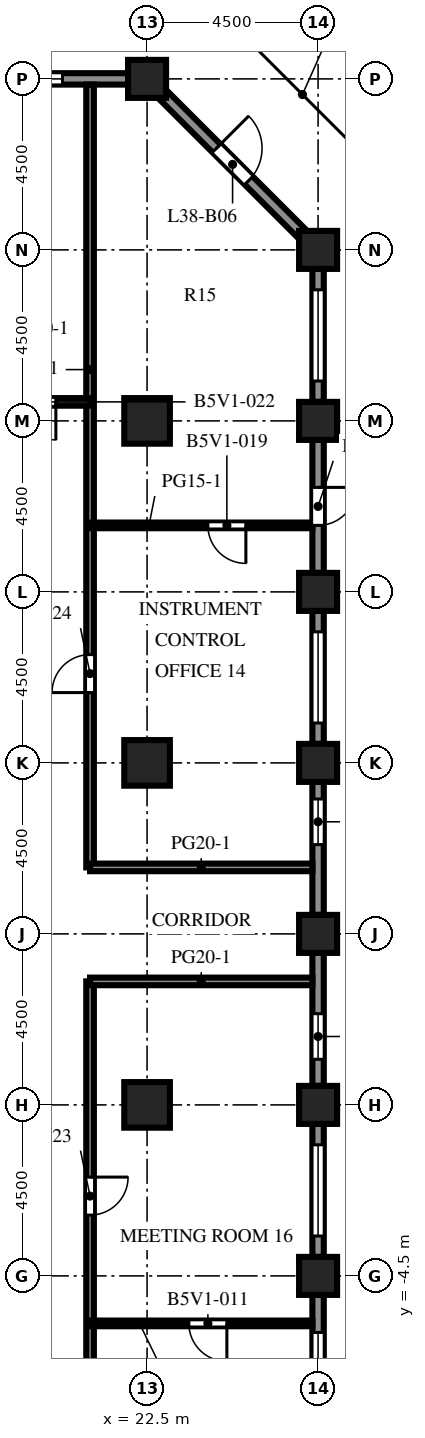
"""IFC4 building model, lengths in metres.
Left out: names, types, materials, properties, quantities, classifications, styles, units other than length and angle.
Written with IfcOpenShell. Run it as: python <this file> out.ifc"""

import sys

from ifc_helpers import new_model, si_unit, direction, frame, frame_2d, origin, origin_2d, place, context, subcontext, project, spatial, rectangle, extrude, element, fill, save


model = new_model("IFC4")
c1 = context("Model", 3, precision=1e-05, world=origin(), true_north=direction((0.0, 1.0)))
c2 = subcontext(c1, "Body", "Model", "MODEL_VIEW")
j1 = project(units=[si_unit("LENGTHUNIT", "METRE"), si_unit("PLANEANGLEUNIT", "RADIAN")], contexts=[c1])
p1 = place(None, origin())
s1 = spatial("IfcSite", under=j1, at=p1, CompositionType="ELEMENT")
p2 = place(p1, origin())
s2 = spatial("IfcBuilding", under=s1, at=p2, CompositionType="ELEMENT")
p3 = place(p2, frame((0.0, 0.0, 169.1)))
s3 = spatial("IfcBuildingStorey", under=s2, at=p3, CompositionType="ELEMENT", Elevation=169.1)
for number, where, z_axis, x_axis in (
    (1, (22.5, 27.0, 0.0), (0.0, 0.0, 1.0), (1.0, 0.0, 0.0)),
    (2, (27.0, -4.5, 0.0), (0.0, 0.0, 1.0), (1.0, 0.0, 0.0)),
    (3, (27.0, 0.0, 0.0), (0.0, 0.0, 1.0), (1.0, 0.0, 0.0)),
    (4, (27.0, 4.5, 0.0), (0.0, 0.0, 1.0), (1.0, 0.0, 0.0)),
    (5, (27.0, 9.0, 0.0), (0.0, 0.0, 1.0), (1.0, 0.0, 0.0)),
    (6, (27.0, 13.5, 0.0), (0.0, 0.0, 1.0), (1.0, 0.0, 0.0)),
    (7, (27.0, 18.0, 0.0), (0.0, 0.0, 1.0), (1.0, 0.0, 0.0)),
    (8, (27.0, 22.5, 0.0), (0.0, 0.0, 1.0), (1.0, 0.0, 0.0)),
):
    element("IfcColumn", number, at=place(p3, frame(where, z_axis=z_axis, x_axis=x_axis)), inside=s3, PredefinedType="COLUMN", context=c2, shape_type="SweptSolid", body=[
        extrude(rectangle(XDim=1.0, YDim=1.0, at=origin_2d()), origin(), (0.0, 0.0, 1.0), 4.1),
    ])
for number, where, z_axis, x_axis in (
    (9, (22.5, 0.0, 0.0), (0.0, 0.0, 1.0), (1.0, 0.0, 0.0)),
    (10, (22.5, 9.0, 0.0), (0.0, 0.0, 1.0), (1.0, 0.0, 0.0)),
    (11, (22.5, 18.0, 0.0), (0.0, 0.0, 1.0), (1.0, 0.0, 0.0)),
):
    element("IfcColumn", number, at=place(p3, frame(where, z_axis=z_axis, x_axis=x_axis)), inside=s3, PredefinedType="COLUMN", context=c2, shape_type="SweptSolid", body=[
        extrude(rectangle(XDim=1.2, YDim=1.2, at=origin_2d()), origin(), (0.0, 0.0, 1.0), 4.1),
    ])
p4 = place(p3, frame((27.0, -5.0, 0.0), z_axis=(0.0, 0.0, 1.0), x_axis=(0.0, -1.0, 0.0)))
e12 = element("IfcWall", 12, at=p4, inside=s3, PredefinedType="SOLIDWALL", context=c2, shape_type="SweptSolid", body=[
    extrude(rectangle(XDim=3.5, YDim=0.3, at=frame_2d((1.75, 0.0))), origin(), (0.0, 0.0, 1.0), 2.85),
])
p5 = place(p4, frame((0.988, 0.0, 0.8)))
e13 = element("IfcOpeningElement", 13, at=p5, cuts=e12, PredefinedType="OPENING", context=c2, shape_type="SweptSolid", body=[
    extrude(rectangle(XDim=2.4, YDim=1.7, at=frame_2d((1.2, 0.85))), frame((0.0, 0.16, 0.0), z_axis=(0.0, -1.0, 0.0), x_axis=(1.0, 0.0, 0.0)), (0.0, 0.0, 1.0), 0.32),
])
p6 = place(p3, frame((27.0, -0.5, 0.0), z_axis=(0.0, 0.0, 1.0), x_axis=(0.0, -1.0, 0.0)))
e14 = element("IfcWall", 14, at=p6, inside=s3, PredefinedType="SOLIDWALL", context=c2, shape_type="SweptSolid", body=[
    extrude(rectangle(XDim=3.5, YDim=0.3, at=frame_2d((1.75, 0.0))), origin(), (0.0, 0.0, 1.0), 2.85),
])
p7 = place(p6, frame((0.55, 0.0, 0.8)))
e15 = element("IfcOpeningElement", 15, at=p7, cuts=e14, PredefinedType="OPENING", context=c2, shape_type="SweptSolid", body=[
    extrude(rectangle(XDim=2.4, YDim=1.7, at=frame_2d((1.2, 0.85))), frame((0.0, 0.16, 0.0), z_axis=(0.0, -1.0, 0.0), x_axis=(1.0, 0.0, 0.0)), (0.0, 0.0, 1.0), 0.32),
])
p8 = place(p3, frame((27.0, 4.0, 0.0), z_axis=(0.0, 0.0, 1.0), x_axis=(0.0, -1.0, 0.0)))
e16 = element("IfcWall", 16, at=p8, inside=s3, PredefinedType="SOLIDWALL", context=c2, shape_type="SweptSolid", body=[
    extrude(rectangle(XDim=3.5, YDim=0.3, at=frame_2d((1.75, 0.0))), origin(), (0.0, 0.0, 1.0), 2.85),
])
p9 = place(p8, frame((1.6, 0.0, 0.8)))
e17 = element("IfcOpeningElement", 17, at=p9, cuts=e16, PredefinedType="OPENING", context=c2, shape_type="SweptSolid", body=[
    extrude(rectangle(XDim=1.2, YDim=1.7, at=frame_2d((0.6, 0.85))), frame((0.0, 0.16, 0.0), z_axis=(0.0, -1.0, 0.0), x_axis=(1.0, 0.0, 0.0)), (0.0, 0.0, 1.0), 0.32),
])
p10 = place(p3, frame((27.0, 8.5, 0.0), z_axis=(0.0, 0.0, 1.0), x_axis=(0.0, -1.0, 0.0)))
e18 = element("IfcWall", 18, at=p10, inside=s3, PredefinedType="SOLIDWALL", context=c2, shape_type="SweptSolid", body=[
    extrude(rectangle(XDim=3.5, YDim=0.3, at=frame_2d((1.75, 0.0))), origin(), (0.0, 0.0, 1.0), 2.85),
])
p11 = place(p10, frame((0.45, 0.0, 0.8)))
e19 = element("IfcOpeningElement", 19, at=p11, cuts=e18, PredefinedType="OPENING", context=c2, shape_type="SweptSolid", body=[
    extrude(rectangle(XDim=1.2, YDim=1.7, at=frame_2d((0.6, 0.85))), frame((0.0, 0.16, 0.0), z_axis=(0.0, -1.0, 0.0), x_axis=(1.0, 0.0, 0.0)), (0.0, 0.0, 1.0), 0.32),
])
p12 = place(p3, frame((27.0, 13.0, 0.0), z_axis=(0.0, 0.0, 1.0), x_axis=(0.0, -1.0, 0.0)))
e20 = element("IfcWall", 20, at=p12, inside=s3, PredefinedType="SOLIDWALL", context=c2, shape_type="SweptSolid", body=[
    extrude(rectangle(XDim=3.5, YDim=0.3, at=frame_2d((1.75, 0.0))), origin(), (0.0, 0.0, 1.0), 2.85),
])
p13 = place(p12, frame((0.55, 0.0, 0.8)))
e21 = element("IfcOpeningElement", 21, at=p13, cuts=e20, PredefinedType="OPENING", context=c2, shape_type="SweptSolid", body=[
    extrude(rectangle(XDim=2.4, YDim=1.7, at=frame_2d((1.2, 0.85))), frame((0.0, 0.16, 0.0), z_axis=(0.0, -1.0, 0.0), x_axis=(1.0, 0.0, 0.0)), (0.0, 0.0, 1.0), 0.32),
])
p14 = place(p3, frame((27.0, 17.5, 0.0), z_axis=(0.0, 0.0, 1.0), x_axis=(0.0, -1.0, 0.0)))
e22 = element("IfcWall", 22, at=p14, inside=s3, PredefinedType="SOLIDWALL", context=c2, shape_type="SweptSolid", body=[
    extrude(rectangle(XDim=3.5, YDim=0.3, at=frame_2d((1.75, 0.0))), origin(), (0.0, 0.0, 1.0), 2.85),
])
p15 = place(p14, frame((1.25, 0.0, 0.0)))
e23 = element("IfcOpeningElement", 23, at=p15, cuts=e22, PredefinedType="OPENING", context=c2, shape_type="SweptSolid", body=[
    extrude(rectangle(XDim=1.0, YDim=2.2, at=frame_2d((0.5, 1.1))), frame((0.0, 0.16, 0.0), z_axis=(0.0, -1.0, 0.0), x_axis=(1.0, 0.0, 0.0)), (0.0, 0.0, 1.0), 0.32),
])
p16 = place(p3, frame((27.0, 22.0, 0.0), z_axis=(0.0, 0.0, 1.0), x_axis=(0.0, -1.0, 0.0)))
e24 = element("IfcWall", 24, at=p16, inside=s3, PredefinedType="SOLIDWALL", context=c2, shape_type="SweptSolid", body=[
    extrude(rectangle(XDim=3.5, YDim=0.3, at=frame_2d((1.75, 0.0))), origin(), (0.0, 0.0, 1.0), 2.85),
])
p17 = place(p16, frame((0.55, 0.0, 0.8)))
e25 = element("IfcOpeningElement", 25, at=p17, cuts=e24, PredefinedType="OPENING", context=c2, shape_type="SweptSolid", body=[
    extrude(rectangle(XDim=2.4, YDim=1.7, at=frame_2d((1.2, 0.85))), frame((0.0, 0.16, 0.0), z_axis=(0.0, -1.0, 0.0), x_axis=(1.0, 0.0, 0.0)), (0.0, 0.0, 1.0), 0.32),
])
p18 = place(p3, frame((22.894, 26.606, 0.0), z_axis=(0.0, 0.0, 1.0), x_axis=(0.707106781187, -0.707106781187, 0.0)))
e26 = element("IfcWall", 26, at=p18, inside=s3, PredefinedType="SOLIDWALL", context=c2, shape_type="SweptSolid", body=[
    extrude(rectangle(XDim=5.25, YDim=0.3, at=frame_2d((2.625, 0.0))), origin(), (0.0, 0.0, 1.0), 2.85),
])
p19 = place(p18, frame((2.025, 0.0, 0.0)))
e27 = element("IfcOpeningElement", 27, at=p19, cuts=e26, PredefinedType="OPENING", context=c2, shape_type="SweptSolid", body=[
    extrude(rectangle(XDim=1.2, YDim=2.2, at=frame_2d((0.6, 1.1))), frame((0.0, 0.16, 0.0), z_axis=(0.0, -1.0, 0.0), x_axis=(1.0, 0.0, 0.0)), (0.0, 0.0, 1.0), 0.32),
])
p20 = place(p3, frame((18.5, 27.0, 0.0), z_axis=(0.0, 0.0, 1.0), x_axis=(1.0, 0.0, 0.0)))
e28 = element("IfcWall", 28, at=p20, inside=s3, PredefinedType="SOLIDWALL", context=c2, shape_type="SweptSolid", body=[
    extrude(rectangle(XDim=3.5, YDim=0.3, at=frame_2d((1.75, 0.0))), origin(), (0.0, 0.0, 1.0), 2.85),
])
p21 = place(p20, frame((0.575, 0.0, 0.8)))
e29 = element("IfcOpeningElement", 29, at=p21, cuts=e28, PredefinedType="OPENING", context=c2, shape_type="SweptSolid", body=[
    extrude(rectangle(XDim=1.2, YDim=1.7, at=frame_2d((0.6, 0.85))), frame((0.0, 0.16, 0.0), z_axis=(0.0, -1.0, 0.0), x_axis=(1.0, 0.0, 0.0)), (0.0, 0.0, 1.0), 0.32),
])
p22 = place(p3, frame((21.0, 3.25, 0.0), z_axis=(0.0, 0.0, 1.0), x_axis=(0.0, -1.0, 0.0)))
e30 = element("IfcWall", 30, at=p22, inside=s3, PredefinedType="PARTITIONING", context=c2, shape_type="SweptSolid", body=[
    extrude(rectangle(XDim=30.1, YDim=0.2, at=frame_2d((15.05, 0.0))), origin(), (0.0, 0.0, 1.0), 3.65),
])
p23 = place(p22, frame((5.15, 0.0, 0.0)))
e31 = element("IfcOpeningElement", 31, at=p23, cuts=e30, PredefinedType="OPENING", context=c2, shape_type="SweptSolid", body=[
    extrude(rectangle(XDim=1.0, YDim=2.1, at=frame_2d((0.5, 1.05))), frame((0.0, 0.11, 0.0), z_axis=(0.0, -1.0, 0.0), x_axis=(1.0, 0.0, 0.0)), (0.0, 0.0, 1.0), 0.22),
])
p24 = place(p3, frame((21.0, 26.85, 0.0), z_axis=(0.0, 0.0, 1.0), x_axis=(0.0, -1.0, 0.0)))
e32 = element("IfcWall", 32, at=p24, inside=s3, PredefinedType="PARTITIONING", context=c2, shape_type="SweptSolid", body=[
    extrude(rectangle(XDim=20.6, YDim=0.2, at=frame_2d((10.3, 0.0))), origin(), (0.0, 0.0, 1.0), 3.65),
])
p25 = place(p24, frame((15.0, 0.0, 0.0)))
e33 = element("IfcOpeningElement", 33, at=p25, cuts=e32, PredefinedType="OPENING", context=c2, shape_type="SweptSolid", body=[
    extrude(rectangle(XDim=1.0, YDim=2.1, at=frame_2d((0.5, 1.05))), frame((0.0, 0.11, 0.0), z_axis=(0.0, -1.0, 0.0), x_axis=(1.0, 0.0, 0.0)), (0.0, 0.0, 1.0), 0.22),
])
p26 = place(p3, frame((26.85, -5.75, 0.0), z_axis=(0.0, 0.0, 1.0), x_axis=(-1.0, 0.0, 0.0)))
e34 = element("IfcWall", 34, at=p26, inside=s3, PredefinedType="PARTITIONING", context=c2, shape_type="SweptSolid", body=[
    extrude(rectangle(XDim=5.85, YDim=0.15, at=frame_2d((2.925, 0.0))), origin(), (0.0, 0.0, 1.0), 3.65),
])
p27 = place(p26, frame((2.25, 0.0, 0.0)))
e35 = element("IfcOpeningElement", 35, at=p27, cuts=e34, PredefinedType="OPENING", context=c2, shape_type="SweptSolid", body=[
    extrude(rectangle(XDim=1.0, YDim=2.1, at=frame_2d((0.5, 1.05))), frame((0.0, 0.085, 0.0), z_axis=(0.0, -1.0, 0.0), x_axis=(1.0, 0.0, 0.0)), (0.0, 0.0, 1.0), 0.17),
])
for number, where, z_axis, x_axis in (
    (36, (21.0, 3.25, 0.0), (0.0, 0.0, 1.0), (1.0, 0.0, 0.0)),
    (37, (21.0, 6.25, 0.0), (0.0, 0.0, 1.0), (1.0, 0.0, 0.0)),
):
    element("IfcWall", number, at=place(p3, frame(where, z_axis=z_axis, x_axis=x_axis)), inside=s3, PredefinedType="PARTITIONING", context=c2, shape_type="SweptSolid", body=[
        extrude(rectangle(XDim=5.85, YDim=0.2, at=frame_2d((2.925, 0.0))), origin(), (0.0, 0.0, 1.0), 3.65),
    ])
p28 = place(p3, frame((21.0, 15.25, 0.0), z_axis=(0.0, 0.0, 1.0), x_axis=(1.0, 0.0, 0.0)))
e38 = element("IfcWall", 38, at=p28, inside=s3, PredefinedType="PARTITIONING", context=c2, shape_type="SweptSolid", body=[
    extrude(rectangle(XDim=5.85, YDim=0.15, at=frame_2d((2.925, 0.0))), origin(), (0.0, 0.0, 1.0), 3.65),
])
p29 = place(p28, frame((3.1, 0.0, 0.0)))
e39 = element("IfcOpeningElement", 39, at=p29, cuts=e38, PredefinedType="OPENING", context=c2, shape_type="SweptSolid", body=[
    extrude(rectangle(XDim=1.0, YDim=2.1, at=frame_2d((0.5, 1.05))), frame((0.0, 0.085, 0.0), z_axis=(0.0, -1.0, 0.0), x_axis=(1.0, 0.0, 0.0)), (0.0, 0.0, 1.0), 0.17),
])
p30 = place(p3, frame((18.0, 18.5, 0.0), z_axis=(0.0, 0.0, 1.0), x_axis=(1.0, 0.0, 0.0)))
e40 = element("IfcWall", 40, at=p30, inside=s3, PredefinedType="PARTITIONING", context=c2, shape_type="SweptSolid", body=[
    extrude(rectangle(XDim=3.0, YDim=0.2, at=frame_2d((1.5, 0.0))), origin(), (0.0, 0.0, 1.0), 3.65),
])
p31 = place(p30, frame((1.1, 0.0, 0.0)))
e41 = element("IfcOpeningElement", 41, at=p31, cuts=e40, PredefinedType="OPENING", context=c2, shape_type="SweptSolid", body=[
    extrude(rectangle(XDim=1.0, YDim=2.1, at=frame_2d((0.5, 1.05))), frame((0.0, 0.11, 0.0), z_axis=(0.0, -1.0, 0.0), x_axis=(1.0, 0.0, 0.0)), (0.0, 0.0, 1.0), 0.22),
])
p32 = place(p5, origin())
e42 = element("IfcWindow", 42, at=p32, inside=s3, PartitioningType="SINGLE_PANEL", PredefinedType="WINDOW", context=c2, shape_type="SweptSolid", body=[
    extrude(rectangle(XDim=2.4, YDim=1.7, at=frame_2d((1.2, 0.85))), frame((0.0, 0.03, 0.0), z_axis=(0.0, -1.0, 0.0), x_axis=(1.0, 0.0, 0.0)), (0.0, 0.0, 1.0), 0.06),
])
fill(e13, e42)
p33 = place(p7, origin())
e43 = element("IfcWindow", 43, at=p33, inside=s3, PartitioningType="SINGLE_PANEL", PredefinedType="WINDOW", context=c2, shape_type="SweptSolid", body=[
    extrude(rectangle(XDim=2.4, YDim=1.7, at=frame_2d((1.2, 0.85))), frame((0.0, 0.03, 0.0), z_axis=(0.0, -1.0, 0.0), x_axis=(1.0, 0.0, 0.0)), (0.0, 0.0, 1.0), 0.06),
])
fill(e15, e43)
p34 = place(p9, origin())
e44 = element("IfcWindow", 44, at=p34, inside=s3, PartitioningType="SINGLE_PANEL", PredefinedType="WINDOW", context=c2, shape_type="SweptSolid", body=[
    extrude(rectangle(XDim=1.2, YDim=1.7, at=frame_2d((0.6, 0.85))), frame((0.0, 0.03, 0.0), z_axis=(0.0, -1.0, 0.0), x_axis=(1.0, 0.0, 0.0)), (0.0, 0.0, 1.0), 0.06),
])
fill(e17, e44)
p35 = place(p11, origin())
e45 = element("IfcWindow", 45, at=p35, inside=s3, PartitioningType="SINGLE_PANEL", PredefinedType="WINDOW", context=c2, shape_type="SweptSolid", body=[
    extrude(rectangle(XDim=1.2, YDim=1.7, at=frame_2d((0.6, 0.85))), frame((0.0, 0.03, 0.0), z_axis=(0.0, -1.0, 0.0), x_axis=(1.0, 0.0, 0.0)), (0.0, 0.0, 1.0), 0.06),
])
fill(e19, e45)
p36 = place(p13, origin())
e46 = element("IfcWindow", 46, at=p36, inside=s3, PartitioningType="SINGLE_PANEL", PredefinedType="WINDOW", context=c2, shape_type="SweptSolid", body=[
    extrude(rectangle(XDim=2.4, YDim=1.7, at=frame_2d((1.2, 0.85))), frame((0.0, 0.03, 0.0), z_axis=(0.0, -1.0, 0.0), x_axis=(1.0, 0.0, 0.0)), (0.0, 0.0, 1.0), 0.06),
])
fill(e21, e46)
p37 = place(p15, origin())
e47 = element("IfcDoor", 47, at=p37, inside=s3, OperationType="SINGLE_SWING_LEFT", PredefinedType="DOOR", context=c2, shape_type="SweptSolid", body=[
    extrude(rectangle(XDim=1.0, YDim=2.2, at=frame_2d((0.5, 1.1))), frame((0.0, 0.025, 0.0), z_axis=(0.0, -1.0, 0.0), x_axis=(1.0, 0.0, 0.0)), (0.0, 0.0, 1.0), 0.05),
])
fill(e23, e47)
p38 = place(p17, origin())
e48 = element("IfcWindow", 48, at=p38, inside=s3, PartitioningType="SINGLE_PANEL", PredefinedType="WINDOW", context=c2, shape_type="SweptSolid", body=[
    extrude(rectangle(XDim=2.4, YDim=1.7, at=frame_2d((1.2, 0.85))), frame((0.0, 0.03, 0.0), z_axis=(0.0, -1.0, 0.0), x_axis=(1.0, 0.0, 0.0)), (0.0, 0.0, 1.0), 0.06),
])
fill(e25, e48)
p39 = place(p19, origin())
e49 = element("IfcDoor", 49, at=p39, inside=s3, OperationType="SINGLE_SWING_LEFT", PredefinedType="DOOR", context=c2, shape_type="SweptSolid", body=[
    extrude(rectangle(XDim=1.2, YDim=2.2, at=frame_2d((0.6, 1.1))), frame((0.0, 0.025, 0.0), z_axis=(0.0, -1.0, 0.0), x_axis=(1.0, 0.0, 0.0)), (0.0, 0.0, 1.0), 0.05),
])
fill(e27, e49)
p40 = place(p21, origin())
e50 = element("IfcWindow", 50, at=p40, inside=s3, PartitioningType="SINGLE_PANEL", PredefinedType="WINDOW", context=c2, shape_type="SweptSolid", body=[
    extrude(rectangle(XDim=1.2, YDim=1.7, at=frame_2d((0.6, 0.85))), frame((0.0, 0.03, 0.0), z_axis=(0.0, -1.0, 0.0), x_axis=(1.0, 0.0, 0.0)), (0.0, 0.0, 1.0), 0.06),
])
fill(e29, e50)
p41 = place(p27, origin())
e51 = element("IfcDoor", 51, at=p41, inside=s3, OperationType="SINGLE_SWING_LEFT", PredefinedType="DOOR", context=c2, shape_type="SweptSolid", body=[
    extrude(rectangle(XDim=1.0, YDim=2.1, at=frame_2d((0.5, 1.05))), frame((0.0, 0.025, 0.0), z_axis=(0.0, -1.0, 0.0), x_axis=(1.0, 0.0, 0.0)), (0.0, 0.0, 1.0), 0.05),
])
fill(e35, e51)
p42 = place(p29, origin())
e52 = element("IfcDoor", 52, at=p42, inside=s3, OperationType="SINGLE_SWING_RIGHT", PredefinedType="DOOR", context=c2, shape_type="SweptSolid", body=[
    extrude(rectangle(XDim=1.0, YDim=2.1, at=frame_2d((0.5, 1.05))), frame((0.0, 0.025, 0.0), z_axis=(0.0, -1.0, 0.0), x_axis=(1.0, 0.0, 0.0)), (0.0, 0.0, 1.0), 0.05),
])
fill(e39, e52)
p43 = place(p31, origin())
e53 = element("IfcDoor", 53, at=p43, inside=s3, OperationType="SINGLE_SWING_RIGHT", PredefinedType="DOOR", context=c2, shape_type="SweptSolid", body=[
    extrude(rectangle(XDim=1.0, YDim=2.1, at=frame_2d((0.5, 1.05))), frame((0.0, 0.025, 0.0), z_axis=(0.0, -1.0, 0.0), x_axis=(1.0, 0.0, 0.0)), (0.0, 0.0, 1.0), 0.05),
])
fill(e41, e53)
p44 = place(p23, origin())
e54 = element("IfcDoor", 54, at=p44, inside=s3, OperationType="SINGLE_SWING_LEFT", PredefinedType="DOOR", context=c2, shape_type="SweptSolid", body=[
    extrude(rectangle(XDim=1.0, YDim=2.1, at=frame_2d((0.5, 1.05))), frame((0.0, 0.025, 0.0), z_axis=(0.0, -1.0, 0.0), x_axis=(1.0, 0.0, 0.0)), (0.0, 0.0, 1.0), 0.05),
])
fill(e31, e54)
p45 = place(p25, origin())
e55 = element("IfcDoor", 55, at=p45, inside=s3, OperationType="SINGLE_SWING_RIGHT", PredefinedType="DOOR", context=c2, shape_type="SweptSolid", body=[
    extrude(rectangle(XDim=1.0, YDim=2.1, at=frame_2d((0.5, 1.05))), frame((0.0, 0.025, 0.0), z_axis=(0.0, -1.0, 0.0), x_axis=(1.0, 0.0, 0.0)), (0.0, 0.0, 1.0), 0.05),
])
fill(e33, e55)
save(model, sys.argv[1])
